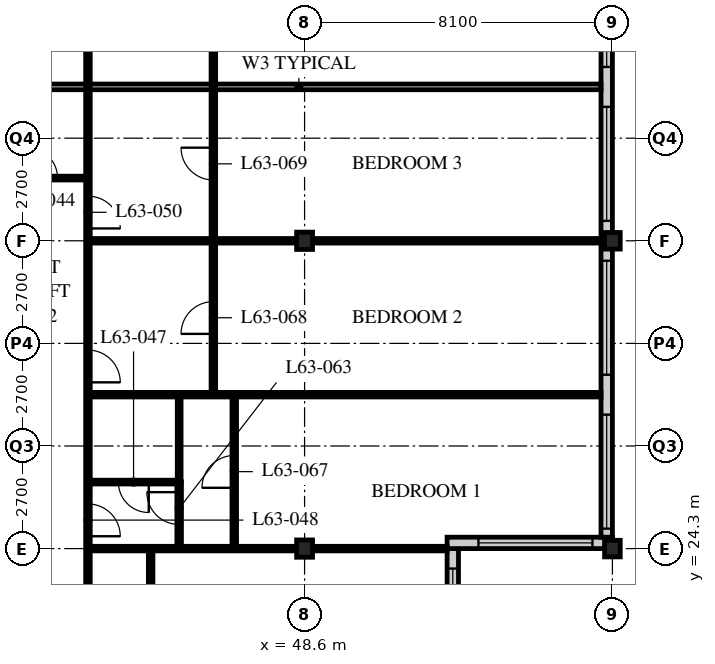
"""IFC4 building model, lengths in metres.
Left out: names, types, materials, properties, quantities, classifications, styles, units other than length and angle.
Written with IfcOpenShell. Run it as: python <this file> out.ifc"""

import sys

from ifc_helpers import new_model, si_unit, direction, frame, frame_2d, origin, origin_2d, place, context, subcontext, project, spatial, rectangle, i_section, extrude, element, fill, save


model = new_model("IFC4")
c1 = context("Model", 3, precision=1e-05, world=origin(), true_north=direction((0.0, 1.0)))
c2 = subcontext(c1, "Body", "Model", "MODEL_VIEW")
j1 = project(units=[si_unit("LENGTHUNIT", "METRE"), si_unit("PLANEANGLEUNIT", "RADIAN")], contexts=[c1])
p1 = place(None, origin())
s1 = spatial("IfcSite", under=j1, at=p1, CompositionType="ELEMENT")
p2 = place(p1, origin())
s2 = spatial("IfcBuilding", under=s1, at=p2, CompositionType="ELEMENT")
p3 = place(p2, frame((0.0, 0.0, 246.3)))
s3 = spatial("IfcBuildingStorey", under=s2, at=p3, CompositionType="ELEMENT", Elevation=246.3)
for number, where, z_axis, x_axis in (
    (1, (48.6, 24.3, 0.0), (0.0, 0.0, 1.0), (1.0, 0.0, 0.0)),
    (2, (48.6, 32.4, 0.0), (0.0, 0.0, 1.0), (1.0, 0.0, 0.0)),
):
    element("IfcColumn", number, at=place(p3, frame(where, z_axis=z_axis, x_axis=x_axis)), inside=s3, PredefinedType="COLUMN", context=c2, shape_type="SweptSolid", body=[
        extrude(i_section(OverallWidth=0.418, OverallDepth=0.456, WebThickness=0.042, FlangeThickness=0.067, FilletRadius=0.015, at=origin_2d()), origin(), (0.0, 0.0, 1.0), 3.9),
    ])
for number, where, z_axis, x_axis in (
    (3, (56.7, 24.3, 0.0), (0.0, 0.0, 1.0), (1.0, 0.0, 0.0)),
    (4, (56.7, 32.4, 0.0), (0.0, 0.0, 1.0), (1.0, 0.0, 0.0)),
):
    element("IfcColumn", number, at=place(p3, frame(where, z_axis=z_axis, x_axis=x_axis)), inside=s3, PredefinedType="COLUMN", context=c2, shape_type="SweptSolid", body=[
        extrude(i_section(OverallWidth=0.412, OverallDepth=0.437, WebThickness=0.036, FlangeThickness=0.058, FilletRadius=0.015, at=origin_2d()), origin(), (0.0, 0.0, 1.0), 3.9),
    ])
p4 = place(p3, frame((52.5, 20.55, 0.0), z_axis=(0.0, 0.0, 1.0), x_axis=(0.0, 1.0, 0.0)))
e5 = element("IfcWall", 5, at=p4, inside=s3, PredefinedType="SOLIDWALL", context=c2, shape_type="SweptSolid", body=[
    extrude(rectangle(XDim=3.75, YDim=0.3, at=frame_2d((1.875, 0.0))), origin(), (0.0, 0.0, 1.0), 3.69),
])
p5 = place(p4, frame((0.225, 0.0, 0.6)))
e6 = element("IfcOpeningElement", 6, at=p5, cuts=e5, PredefinedType="OPENING", context=c2, shape_type="SweptSolid", body=[
    extrude(rectangle(XDim=3.0, YDim=2.3, at=frame_2d((1.5, 1.15))), frame((0.0, 0.16, 0.0), z_axis=(0.0, -1.0, 0.0), x_axis=(1.0, 0.0, 0.0)), (0.0, 0.0, 1.0), 0.32),
])
p6 = place(p3, frame((52.35, 24.45, 0.0), z_axis=(0.0, 0.0, 1.0), x_axis=(1.0, 0.0, 0.0)))
e7 = element("IfcWall", 7, at=p6, inside=s3, PredefinedType="SOLIDWALL", context=c2, shape_type="SweptSolid", body=[
    extrude(rectangle(XDim=4.35, YDim=0.3, at=frame_2d((2.175, 0.0))), origin(), (0.0, 0.0, 1.0), 3.69),
])
p7 = place(p6, frame((0.825, 0.0, 0.6)))
e8 = element("IfcOpeningElement", 8, at=p7, cuts=e7, PredefinedType="OPENING", context=c2, shape_type="SweptSolid", body=[
    extrude(rectangle(XDim=3.0, YDim=2.3, at=frame_2d((1.5, 1.15))), frame((0.0, 0.16, 0.0), z_axis=(0.0, -1.0, 0.0), x_axis=(1.0, 0.0, 0.0)), (0.0, 0.0, 1.0), 0.32),
])
p8 = place(p3, frame((56.55, 24.6, 0.0), z_axis=(0.0, 0.0, 1.0), x_axis=(0.0, 1.0, 0.0)))
e9 = element("IfcWall", 9, at=p8, inside=s3, PredefinedType="SOLIDWALL", context=c2, shape_type="SweptSolid", body=[
    extrude(rectangle(XDim=32.1, YDim=0.3, at=frame_2d((16.05, 0.0))), origin(), (0.0, 0.0, 1.0), 3.69),
])
p9 = place(p8, frame((0.225, 0.0, 0.6)))
e10 = element("IfcOpeningElement", 10, at=p9, cuts=e9, PredefinedType="OPENING", context=c2, shape_type="SweptSolid", body=[
    extrude(rectangle(XDim=3.0, YDim=2.4, at=frame_2d((1.5, 1.2))), frame((0.0, 0.16, 0.0), z_axis=(0.0, -1.0, 0.0), x_axis=(1.0, 0.0, 0.0)), (0.0, 0.0, 1.0), 0.32),
])
p10 = place(p8, frame((4.275, 0.0, 0.6)))
e11 = element("IfcOpeningElement", 11, at=p10, cuts=e9, PredefinedType="OPENING", context=c2, shape_type="SweptSolid", body=[
    extrude(rectangle(XDim=3.0, YDim=2.4, at=frame_2d((1.5, 1.2))), frame((0.0, 0.16, 0.0), z_axis=(0.0, -1.0, 0.0), x_axis=(1.0, 0.0, 0.0)), (0.0, 0.0, 1.0), 0.32),
])
p11 = place(p8, frame((8.325, 0.0, 0.6)))
e12 = element("IfcOpeningElement", 12, at=p11, cuts=e9, PredefinedType="OPENING", context=c2, shape_type="SweptSolid", body=[
    extrude(rectangle(XDim=3.0, YDim=2.4, at=frame_2d((1.5, 1.2))), frame((0.0, 0.16, 0.0), z_axis=(0.0, -1.0, 0.0), x_axis=(1.0, 0.0, 0.0)), (0.0, 0.0, 1.0), 0.32),
])
p12 = place(p8, frame((12.375, 0.0, 0.6)))
e13 = element("IfcOpeningElement", 13, at=p12, cuts=e9, PredefinedType="OPENING", context=c2, shape_type="SweptSolid", body=[
    extrude(rectangle(XDim=3.0, YDim=2.4, at=frame_2d((1.5, 1.2))), frame((0.0, 0.16, 0.0), z_axis=(0.0, -1.0, 0.0), x_axis=(1.0, 0.0, 0.0)), (0.0, 0.0, 1.0), 0.32),
])
p13 = place(p8, frame((16.425, 0.0, 0.6)))
e14 = element("IfcOpeningElement", 14, at=p13, cuts=e9, PredefinedType="OPENING", context=c2, shape_type="SweptSolid", body=[
    extrude(rectangle(XDim=3.0, YDim=2.4, at=frame_2d((1.5, 1.2))), frame((0.0, 0.16, 0.0), z_axis=(0.0, -1.0, 0.0), x_axis=(1.0, 0.0, 0.0)), (0.0, 0.0, 1.0), 0.32),
])
p14 = place(p8, frame((20.475, 0.0, 0.6)))
e15 = element("IfcOpeningElement", 15, at=p14, cuts=e9, PredefinedType="OPENING", context=c2, shape_type="SweptSolid", body=[
    extrude(rectangle(XDim=3.0, YDim=2.4, at=frame_2d((1.5, 1.2))), frame((0.0, 0.16, 0.0), z_axis=(0.0, -1.0, 0.0), x_axis=(1.0, 0.0, 0.0)), (0.0, 0.0, 1.0), 0.32),
])
p15 = place(p8, frame((24.525, 0.0, 0.6)))
e16 = element("IfcOpeningElement", 16, at=p15, cuts=e9, PredefinedType="OPENING", context=c2, shape_type="SweptSolid", body=[
    extrude(rectangle(XDim=3.0, YDim=2.4, at=frame_2d((1.5, 1.2))), frame((0.0, 0.16, 0.0), z_axis=(0.0, -1.0, 0.0), x_axis=(1.0, 0.0, 0.0)), (0.0, 0.0, 1.0), 0.32),
])
p16 = place(p8, frame((28.575, 0.0, 0.6)))
e17 = element("IfcOpeningElement", 17, at=p16, cuts=e9, PredefinedType="OPENING", context=c2, shape_type="SweptSolid", body=[
    extrude(rectangle(XDim=3.0, YDim=2.4, at=frame_2d((1.5, 1.2))), frame((0.0, 0.16, 0.0), z_axis=(0.0, -1.0, 0.0), x_axis=(1.0, 0.0, 0.0)), (0.0, 0.0, 1.0), 0.32),
])
p17 = place(p3, frame((40.5, 34.05, 0.0), z_axis=(0.0, 0.0, 1.0), x_axis=(1.0, 0.0, 0.0)))
e18 = element("IfcWall", 18, at=p17, inside=s3, PredefinedType="PARTITIONING", context=c2, shape_type="SweptSolid", body=[
    extrude(rectangle(XDim=2.4, YDim=0.1, at=frame_2d((1.2, 0.0))), origin(), (0.0, 0.0, 1.0), 3.69),
])
p18 = place(p17, frame((0.8, 0.0, 0.0)))
e19 = element("IfcOpeningElement", 19, at=p18, cuts=e18, PredefinedType="OPENING", context=c2, shape_type="SweptSolid", body=[
    extrude(rectangle(XDim=0.8, YDim=2.1, at=frame_2d((0.4, 1.05))), frame((0.0, 0.06, 0.0), z_axis=(0.0, -1.0, 0.0), x_axis=(1.0, 0.0, 0.0)), (0.0, 0.0, 1.0), 0.12),
])
p19 = place(p3, frame((42.9, 22.5, 0.0), z_axis=(0.0, 0.0, 1.0), x_axis=(0.0, 1.0, 0.0)))
e20 = element("IfcWall", 20, at=p19, inside=s3, PredefinedType="PARTITIONING", context=c2, shape_type="SweptSolid", body=[
    extrude(rectangle(XDim=13.95, YDim=0.12, at=frame_2d((6.975, 0.0))), origin(), (0.0, 0.0, 1.0), 3.69),
])
p20 = place(p19, frame((2.125, 0.0, 0.0)))
e21 = element("IfcOpeningElement", 21, at=p20, cuts=e20, PredefinedType="OPENING", context=c2, shape_type="SweptSolid", body=[
    extrude(rectangle(XDim=0.85, YDim=2.1, at=frame_2d((0.425, 1.05))), frame((0.0, 0.07, 0.0), z_axis=(0.0, -1.0, 0.0), x_axis=(1.0, 0.0, 0.0)), (0.0, 0.0, 1.0), 0.14),
])
p21 = place(p19, frame((6.175, 0.0, 0.0)))
e22 = element("IfcOpeningElement", 22, at=p21, cuts=e20, PredefinedType="OPENING", context=c2, shape_type="SweptSolid", body=[
    extrude(rectangle(XDim=0.85, YDim=2.1, at=frame_2d((0.425, 1.05))), frame((0.0, 0.07, 0.0), z_axis=(0.0, -1.0, 0.0), x_axis=(1.0, 0.0, 0.0)), (0.0, 0.0, 1.0), 0.14),
])
p22 = place(p19, frame((10.225, 0.0, 0.0)))
e23 = element("IfcOpeningElement", 23, at=p22, cuts=e20, PredefinedType="OPENING", context=c2, shape_type="SweptSolid", body=[
    extrude(rectangle(XDim=0.85, YDim=2.1, at=frame_2d((0.425, 1.05))), frame((0.0, 0.07, 0.0), z_axis=(0.0, -1.0, 0.0), x_axis=(1.0, 0.0, 0.0)), (0.0, 0.0, 1.0), 0.14),
])
p23 = place(p3, frame((42.9, 24.3, 0.0), z_axis=(0.0, 0.0, 1.0), x_axis=(1.0, 0.0, 0.0)))
e24 = element("IfcWall", 24, at=p23, inside=s3, PredefinedType="PARTITIONING", context=c2, shape_type="SweptSolid", body=[
    extrude(rectangle(XDim=9.45, YDim=0.12, at=frame_2d((4.725, 0.0))), origin(), (0.0, 0.0, 1.0), 3.078),
])
p24 = place(p3, frame((40.5, 36.45, 0.0), z_axis=(0.0, 0.0, 1.0), x_axis=(1.0, 0.0, 0.0)))
e25 = element("IfcWall", 25, at=p24, inside=s3, PredefinedType="PARTITIONING", context=c2, shape_type="SweptSolid", body=[
    extrude(rectangle(XDim=15.9, YDim=0.15, at=frame_2d((7.95, 0.0))), origin(), (0.0, 0.0, 1.0), 3.69),
])
p25 = place(p3, frame((44.55, 16.5, 0.0), z_axis=(0.0, 0.0, 1.0), x_axis=(0.0, 1.0, 0.0)))
e26 = element("IfcWall", 26, at=p25, inside=s3, PredefinedType="PARTITIONING", context=c2, shape_type="SweptSolid", body=[
    extrude(rectangle(XDim=7.8, YDim=0.12, at=frame_2d((3.9, 0.0))), origin(), (0.0, 0.0, 1.0), 3.69),
])
p26 = place(p25, frame((3.475, 0.0, 0.0)))
e27 = element("IfcOpeningElement", 27, at=p26, cuts=e26, PredefinedType="OPENING", context=c2, shape_type="SweptSolid", body=[
    extrude(rectangle(XDim=0.85, YDim=2.1, at=frame_2d((0.425, 1.05))), frame((0.0, 0.07, 0.0), z_axis=(0.0, -1.0, 0.0), x_axis=(1.0, 0.0, 0.0)), (0.0, 0.0, 1.0), 0.14),
])
p27 = place(p3, frame((42.9, 26.05, 0.0), z_axis=(0.0, 0.0, 1.0), x_axis=(1.0, 0.0, 0.0)))
e28 = element("IfcWall", 28, at=p27, inside=s3, PredefinedType="PARTITIONING", context=c2, shape_type="SweptSolid", body=[
    extrude(rectangle(XDim=2.4, YDim=0.1, at=frame_2d((1.2, 0.0))), origin(), (0.0, 0.0, 1.0), 3.69),
])
p28 = place(p27, frame((0.8, 0.0, 0.0)))
e29 = element("IfcOpeningElement", 29, at=p28, cuts=e28, PredefinedType="OPENING", context=c2, shape_type="SweptSolid", body=[
    extrude(rectangle(XDim=0.8, YDim=2.1, at=frame_2d((0.4, 1.05))), frame((0.0, 0.06, 0.0), z_axis=(0.0, -1.0, 0.0), x_axis=(1.0, 0.0, 0.0)), (0.0, 0.0, 1.0), 0.12),
])
p29 = place(p3, frame((45.3, 26.05, 0.0), z_axis=(0.0, 0.0, 1.0), x_axis=(0.0, 1.0, 0.0)))
e30 = element("IfcWall", 30, at=p29, inside=s3, PredefinedType="PARTITIONING", context=c2, shape_type="SweptSolid", body=[
    extrude(rectangle(XDim=2.3, YDim=0.1, at=frame_2d((1.15, 0.0))), origin(), (0.0, 0.0, 1.0), 3.69),
])
p30 = place(p3, frame((42.9, 28.35, 0.0), z_axis=(0.0, 0.0, 1.0), x_axis=(1.0, 0.0, 0.0)))
e31 = element("IfcWall", 31, at=p30, inside=s3, PredefinedType="PARTITIONING", context=c2, shape_type="SweptSolid", body=[
    extrude(rectangle(XDim=13.5, YDim=0.12, at=frame_2d((6.75, 0.0))), origin(), (0.0, 0.0, 1.0), 3.69),
])
p31 = place(p3, frame((42.9, 32.4, 0.0), z_axis=(0.0, 0.0, 1.0), x_axis=(1.0, 0.0, 0.0)))
e32 = element("IfcWall", 32, at=p31, inside=s3, PredefinedType="PARTITIONING", context=c2, shape_type="SweptSolid", body=[
    extrude(rectangle(XDim=13.5, YDim=0.12, at=frame_2d((6.75, 0.0))), origin(), (0.0, 0.0, 1.0), 3.078),
])
p32 = place(p3, frame((42.9, 52.65, 0.0), z_axis=(0.0, 0.0, 1.0), x_axis=(0.0, -1.0, 0.0)))
e33 = element("IfcWall", 33, at=p32, inside=s3, PredefinedType="PARTITIONING", context=c2, shape_type="SweptSolid", body=[
    extrude(rectangle(XDim=16.2, YDim=0.12, at=frame_2d((8.1, 0.0))), origin(), (0.0, 0.0, 1.0), 3.69),
])
p33 = place(p32, frame((2.125, 0.0, 0.0)))
e34 = element("IfcOpeningElement", 34, at=p33, cuts=e33, PredefinedType="OPENING", context=c2, shape_type="SweptSolid", body=[
    extrude(rectangle(XDim=0.85, YDim=2.1, at=frame_2d((0.425, 1.05))), frame((0.0, 0.07, 0.0), z_axis=(0.0, -1.0, 0.0), x_axis=(1.0, 0.0, 0.0)), (0.0, 0.0, 1.0), 0.14),
])
p34 = place(p32, frame((8.425, 0.0, 0.0)))
e35 = element("IfcOpeningElement", 35, at=p34, cuts=e33, PredefinedType="OPENING", context=c2, shape_type="SweptSolid", body=[
    extrude(rectangle(XDim=0.85, YDim=2.1, at=frame_2d((0.425, 1.05))), frame((0.0, 0.07, 0.0), z_axis=(0.0, -1.0, 0.0), x_axis=(1.0, 0.0, 0.0)), (0.0, 0.0, 1.0), 0.14),
])
p35 = place(p32, frame((12.475, 0.0, 0.0)))
e36 = element("IfcOpeningElement", 36, at=p35, cuts=e33, PredefinedType="OPENING", context=c2, shape_type="SweptSolid", body=[
    extrude(rectangle(XDim=0.85, YDim=2.1, at=frame_2d((0.425, 1.05))), frame((0.0, 0.07, 0.0), z_axis=(0.0, -1.0, 0.0), x_axis=(1.0, 0.0, 0.0)), (0.0, 0.0, 1.0), 0.14),
])
p36 = place(p3, frame((45.3, 24.3, 0.0), z_axis=(0.0, 0.0, 1.0), x_axis=(0.0, 1.0, 0.0)))
e37 = element("IfcWall", 37, at=p36, inside=s3, PredefinedType="PARTITIONING", context=c2, shape_type="SweptSolid", body=[
    extrude(rectangle(XDim=1.76, YDim=0.12, at=frame_2d((0.88, 0.0))), origin(), (0.0, 0.0, 1.0), 3.69),
])
p37 = place(p36, frame((0.635, 0.0, 0.0)))
e38 = element("IfcOpeningElement", 38, at=p37, cuts=e37, PredefinedType="OPENING", context=c2, shape_type="SweptSolid", body=[
    extrude(rectangle(XDim=0.85, YDim=2.1, at=frame_2d((0.425, 1.05))), frame((0.0, 0.07, 0.0), z_axis=(0.0, -1.0, 0.0), x_axis=(1.0, 0.0, 0.0)), (0.0, 0.0, 1.0), 0.14),
])
p38 = place(p3, frame((46.75, 24.3, 0.0), z_axis=(0.0, 0.0, 1.0), x_axis=(0.0, 1.0, 0.0)))
e39 = element("IfcWall", 39, at=p38, inside=s3, PredefinedType="PARTITIONING", context=c2, shape_type="SweptSolid", body=[
    extrude(rectangle(XDim=4.05, YDim=0.12, at=frame_2d((2.025, 0.0))), origin(), (0.0, 0.0, 1.0), 3.69),
])
p39 = place(p38, frame((1.6, 0.0, 0.0)))
e40 = element("IfcOpeningElement", 40, at=p39, cuts=e39, PredefinedType="OPENING", context=c2, shape_type="SweptSolid", body=[
    extrude(rectangle(XDim=0.85, YDim=2.1, at=frame_2d((0.425, 1.05))), frame((0.0, 0.07, 0.0), z_axis=(0.0, -1.0, 0.0), x_axis=(1.0, 0.0, 0.0)), (0.0, 0.0, 1.0), 0.14),
])
p40 = place(p3, frame((46.2, 28.35, 0.0), z_axis=(0.0, 0.0, 1.0), x_axis=(0.0, 1.0, 0.0)))
e41 = element("IfcWall", 41, at=p40, inside=s3, PredefinedType="PARTITIONING", context=c2, shape_type="SweptSolid", body=[
    extrude(rectangle(XDim=16.2, YDim=0.12, at=frame_2d((8.1, 0.0))), origin(), (0.0, 0.0, 1.0), 3.69),
])
p41 = place(p40, frame((1.6, 0.0, 0.0)))
e42 = element("IfcOpeningElement", 42, at=p41, cuts=e41, PredefinedType="OPENING", context=c2, shape_type="SweptSolid", body=[
    extrude(rectangle(XDim=0.85, YDim=2.1, at=frame_2d((0.425, 1.05))), frame((0.0, 0.07, 0.0), z_axis=(0.0, -1.0, 0.0), x_axis=(1.0, 0.0, 0.0)), (0.0, 0.0, 1.0), 0.14),
])
p42 = place(p40, frame((5.65, 0.0, 0.0)))
e43 = element("IfcOpeningElement", 43, at=p42, cuts=e41, PredefinedType="OPENING", context=c2, shape_type="SweptSolid", body=[
    extrude(rectangle(XDim=0.85, YDim=2.1, at=frame_2d((0.425, 1.05))), frame((0.0, 0.07, 0.0), z_axis=(0.0, -1.0, 0.0), x_axis=(1.0, 0.0, 0.0)), (0.0, 0.0, 1.0), 0.14),
])
p43 = place(p40, frame((13.75, 0.0, 0.0)))
e44 = element("IfcOpeningElement", 44, at=p43, cuts=e41, PredefinedType="OPENING", context=c2, shape_type="SweptSolid", body=[
    extrude(rectangle(XDim=0.85, YDim=2.1, at=frame_2d((0.425, 1.05))), frame((0.0, 0.07, 0.0), z_axis=(0.0, -1.0, 0.0), x_axis=(1.0, 0.0, 0.0)), (0.0, 0.0, 1.0), 0.14),
])
p44 = place(p40, frame((9.7, 0.0, 0.0)))
e45 = element("IfcOpeningElement", 45, at=p44, cuts=e41, PredefinedType="OPENING", context=c2, shape_type="SweptSolid", body=[
    extrude(rectangle(XDim=0.85, YDim=2.1, at=frame_2d((0.425, 1.05))), frame((0.0, 0.07, 0.0), z_axis=(0.0, -1.0, 0.0), x_axis=(1.0, 0.0, 0.0)), (0.0, 0.0, 1.0), 0.14),
])
p45 = place(p5, origin())
e46 = element("IfcWindow", 46, at=p45, inside=s3, PartitioningType="SINGLE_PANEL", PredefinedType="WINDOW", context=c2, shape_type="SweptSolid", body=[
    extrude(rectangle(XDim=3.0, YDim=2.3, at=frame_2d((1.5, 1.15))), frame((0.0, 0.03, 0.0), z_axis=(0.0, -1.0, 0.0), x_axis=(1.0, 0.0, 0.0)), (0.0, 0.0, 1.0), 0.06),
])
fill(e6, e46)
p46 = place(p7, origin())
e47 = element("IfcWindow", 47, at=p46, inside=s3, PartitioningType="SINGLE_PANEL", PredefinedType="WINDOW", context=c2, shape_type="SweptSolid", body=[
    extrude(rectangle(XDim=3.0, YDim=2.3, at=frame_2d((1.5, 1.15))), frame((0.0, 0.03, 0.0), z_axis=(0.0, -1.0, 0.0), x_axis=(1.0, 0.0, 0.0)), (0.0, 0.0, 1.0), 0.06),
])
fill(e8, e47)
p47 = place(p9, origin())
e48 = element("IfcWindow", 48, at=p47, inside=s3, PartitioningType="SINGLE_PANEL", PredefinedType="WINDOW", context=c2, shape_type="SweptSolid", body=[
    extrude(rectangle(XDim=3.0, YDim=2.4, at=frame_2d((1.5, 1.2))), frame((0.0, 0.03, 0.0), z_axis=(0.0, -1.0, 0.0), x_axis=(1.0, 0.0, 0.0)), (0.0, 0.0, 1.0), 0.06),
])
fill(e10, e48)
p48 = place(p10, origin())
e49 = element("IfcWindow", 49, at=p48, inside=s3, PartitioningType="SINGLE_PANEL", PredefinedType="WINDOW", context=c2, shape_type="SweptSolid", body=[
    extrude(rectangle(XDim=3.0, YDim=2.4, at=frame_2d((1.5, 1.2))), frame((0.0, 0.03, 0.0), z_axis=(0.0, -1.0, 0.0), x_axis=(1.0, 0.0, 0.0)), (0.0, 0.0, 1.0), 0.06),
])
fill(e11, e49)
p49 = place(p11, origin())
e50 = element("IfcWindow", 50, at=p49, inside=s3, PartitioningType="SINGLE_PANEL", PredefinedType="WINDOW", context=c2, shape_type="SweptSolid", body=[
    extrude(rectangle(XDim=3.0, YDim=2.4, at=frame_2d((1.5, 1.2))), frame((0.0, 0.03, 0.0), z_axis=(0.0, -1.0, 0.0), x_axis=(1.0, 0.0, 0.0)), (0.0, 0.0, 1.0), 0.06),
])
fill(e12, e50)
p50 = place(p12, origin())
e51 = element("IfcWindow", 51, at=p50, inside=s3, PartitioningType="SINGLE_PANEL", PredefinedType="WINDOW", context=c2, shape_type="SweptSolid", body=[
    extrude(rectangle(XDim=3.0, YDim=2.4, at=frame_2d((1.5, 1.2))), frame((0.0, 0.03, 0.0), z_axis=(0.0, -1.0, 0.0), x_axis=(1.0, 0.0, 0.0)), (0.0, 0.0, 1.0), 0.06),
])
fill(e13, e51)
p51 = place(p18, origin())
e52 = element("IfcDoor", 52, at=p51, inside=s3, OperationType="SINGLE_SWING_LEFT", PredefinedType="DOOR", context=c2, shape_type="SweptSolid", body=[
    extrude(rectangle(XDim=0.8, YDim=2.1, at=frame_2d((0.4, 1.05))), frame((0.0, 0.025, 0.0), z_axis=(0.0, -1.0, 0.0), x_axis=(1.0, 0.0, 0.0)), (0.0, 0.0, 1.0), 0.05),
])
fill(e19, e52)
p52 = place(p28, origin())
e53 = element("IfcDoor", 53, at=p52, inside=s3, OperationType="SINGLE_SWING_LEFT", PredefinedType="DOOR", context=c2, shape_type="SweptSolid", body=[
    extrude(rectangle(XDim=0.8, YDim=2.1, at=frame_2d((0.4, 1.05))), frame((0.0, 0.025, 0.0), z_axis=(0.0, -1.0, 0.0), x_axis=(1.0, 0.0, 0.0)), (0.0, 0.0, 1.0), 0.05),
])
fill(e29, e53)
p53 = place(p20, origin())
e54 = element("IfcDoor", 54, at=p53, inside=s3, OperationType="SINGLE_SWING_RIGHT", PredefinedType="DOOR", context=c2, shape_type="SweptSolid", body=[
    extrude(rectangle(XDim=0.85, YDim=2.1, at=frame_2d((0.425, 1.05))), frame((0.0, 0.025, 0.0), z_axis=(0.0, -1.0, 0.0), x_axis=(1.0, 0.0, 0.0)), (0.0, 0.0, 1.0), 0.05),
])
fill(e21, e54)
p54 = place(p21, origin())
e55 = element("IfcDoor", 55, at=p54, inside=s3, OperationType="SINGLE_SWING_RIGHT", PredefinedType="DOOR", context=c2, shape_type="SweptSolid", body=[
    extrude(rectangle(XDim=0.85, YDim=2.1, at=frame_2d((0.425, 1.05))), frame((0.0, 0.025, 0.0), z_axis=(0.0, -1.0, 0.0), x_axis=(1.0, 0.0, 0.0)), (0.0, 0.0, 1.0), 0.05),
])
fill(e22, e55)
p55 = place(p22, origin())
e56 = element("IfcDoor", 56, at=p55, inside=s3, OperationType="SINGLE_SWING_RIGHT", PredefinedType="DOOR", context=c2, shape_type="SweptSolid", body=[
    extrude(rectangle(XDim=0.85, YDim=2.1, at=frame_2d((0.425, 1.05))), frame((0.0, 0.025, 0.0), z_axis=(0.0, -1.0, 0.0), x_axis=(1.0, 0.0, 0.0)), (0.0, 0.0, 1.0), 0.05),
])
fill(e23, e56)
p56 = place(p37, origin())
e57 = element("IfcDoor", 57, at=p56, inside=s3, OperationType="SINGLE_SWING_RIGHT", PredefinedType="DOOR", context=c2, shape_type="SweptSolid", body=[
    extrude(rectangle(XDim=0.85, YDim=2.1, at=frame_2d((0.425, 1.05))), frame((0.0, 0.025, 0.0), z_axis=(0.0, -1.0, 0.0), x_axis=(1.0, 0.0, 0.0)), (0.0, 0.0, 1.0), 0.05),
])
fill(e38, e57)
p57 = place(p39, origin())
e58 = element("IfcDoor", 58, at=p57, inside=s3, OperationType="SINGLE_SWING_LEFT", PredefinedType="DOOR", context=c2, shape_type="SweptSolid", body=[
    extrude(rectangle(XDim=0.85, YDim=2.1, at=frame_2d((0.425, 1.05))), frame((0.0, 0.025, 0.0), z_axis=(0.0, -1.0, 0.0), x_axis=(1.0, 0.0, 0.0)), (0.0, 0.0, 1.0), 0.05),
])
fill(e40, e58)
p58 = place(p41, origin())
e59 = element("IfcDoor", 59, at=p58, inside=s3, OperationType="SINGLE_SWING_LEFT", PredefinedType="DOOR", context=c2, shape_type="SweptSolid", body=[
    extrude(rectangle(XDim=0.85, YDim=2.1, at=frame_2d((0.425, 1.05))), frame((0.0, 0.025, 0.0), z_axis=(0.0, -1.0, 0.0), x_axis=(1.0, 0.0, 0.0)), (0.0, 0.0, 1.0), 0.05),
])
fill(e42, e59)
p59 = place(p42, origin())
e60 = element("IfcDoor", 60, at=p59, inside=s3, OperationType="SINGLE_SWING_RIGHT", PredefinedType="DOOR", context=c2, shape_type="SweptSolid", body=[
    extrude(rectangle(XDim=0.85, YDim=2.1, at=frame_2d((0.425, 1.05))), frame((0.0, 0.025, 0.0), z_axis=(0.0, -1.0, 0.0), x_axis=(1.0, 0.0, 0.0)), (0.0, 0.0, 1.0), 0.05),
])
fill(e43, e60)
save(model, sys.argv[1])
